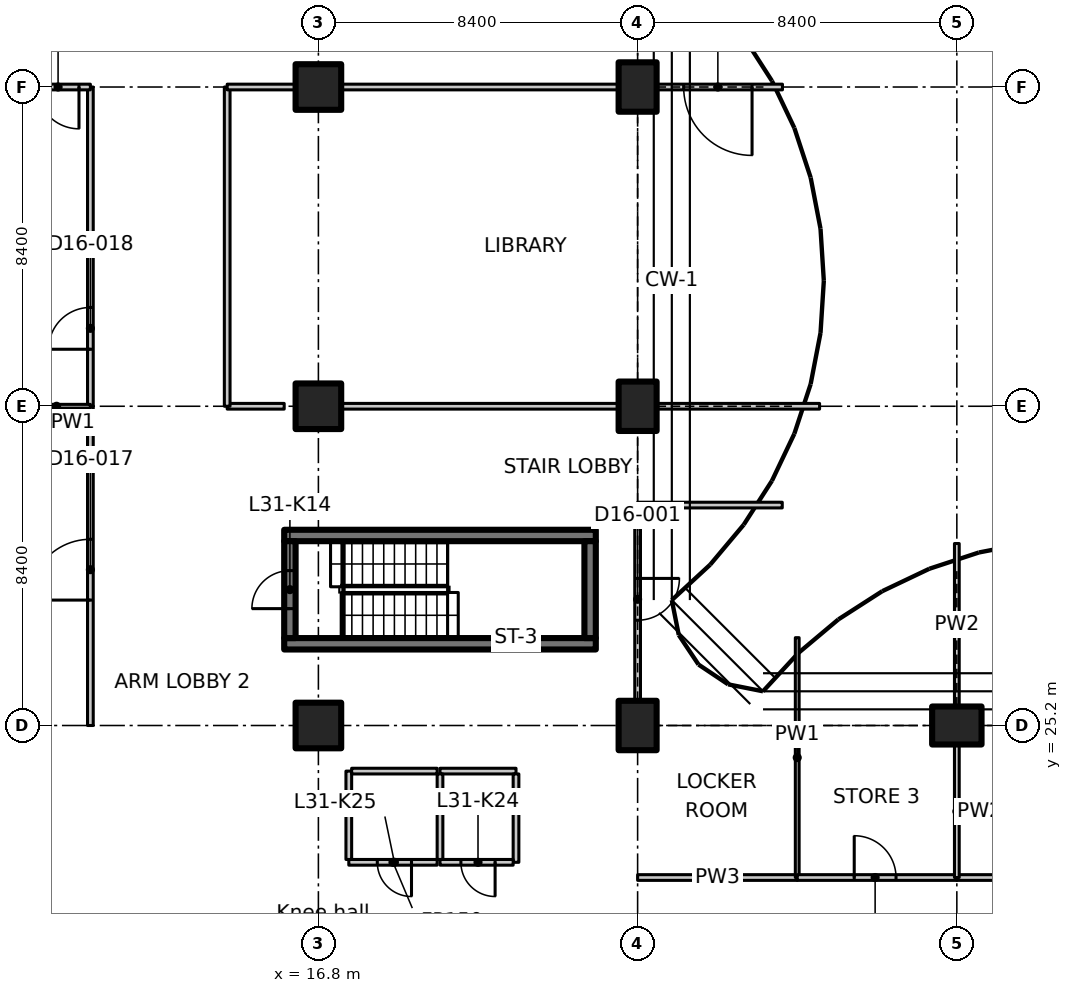
"""IFC4 building model, lengths in metres.
Left out: names, types, materials, properties, quantities, classifications, styles, units other than length and angle.
Written with IfcOpenShell. Run it as: python <this file> out.ifc"""

import sys

from ifc_helpers import new_model, si_unit, direction, frame, frame_2d, origin, origin_2d, place, context, subcontext, project, spatial, polyline, rectangle, outline, extrude, element, fill, save


model = new_model("IFC4")
c1 = context("Model", 3, precision=1e-05, world=origin(), true_north=direction((0.0, 1.0)))
c2 = subcontext(c1, "Body", "Model", "MODEL_VIEW")
j1 = project(units=[si_unit("LENGTHUNIT", "METRE"), si_unit("PLANEANGLEUNIT", "RADIAN")], contexts=[c1])
p1 = place(None, origin())
s1 = spatial("IfcSite", under=j1, at=p1, CompositionType="ELEMENT")
p2 = place(p1, origin())
s2 = spatial("IfcBuilding", under=s1, at=p2, CompositionType="ELEMENT")
p3 = place(p2, frame((0.0, 0.0, 127.7)))
s3 = spatial("IfcBuildingStorey", under=s2, at=p3, CompositionType="ELEMENT", Elevation=127.7)
for number, where, z_axis, x_axis in (
    (1, (16.8, 25.2, 0.0), (0.0, 0.0, 1.0), (1.0, 0.0, 0.0)),
    (2, (16.8, 33.6, 0.0), (0.0, 0.0, 1.0), (1.0, 0.0, 0.0)),
    (3, (16.8, 42.0, 0.0), (0.0, 0.0, 1.0), (1.0, 0.0, 0.0)),
):
    element("IfcColumn", number, at=place(p3, frame(where, z_axis=z_axis, x_axis=x_axis)), inside=s3, PredefinedType="COLUMN", context=c2, shape_type="SweptSolid", body=[
        extrude(rectangle(XDim=1.2, YDim=1.2, at=origin_2d()), origin(), (0.0, 0.0, 1.0), 3.35),
    ])
for number, where, z_axis, x_axis in (
    (4, (25.2, 25.2, 0.0), (0.0, 0.0, 1.0), (1.0, 0.0, 0.0)),
    (5, (25.2, 33.6, 0.0), (0.0, 0.0, 1.0), (1.0, 0.0, 0.0)),
    (6, (25.2, 42.0, 0.0), (0.0, 0.0, 1.0), (1.0, 0.0, 0.0)),
    (7, (33.6, 25.2, 0.0), (0.0, 0.0, 1.0), (0.0, 1.0, 0.0)),
):
    element("IfcColumn", number, at=place(p3, frame(where, z_axis=z_axis, x_axis=x_axis)), inside=s3, PredefinedType="COLUMN", context=c2, shape_type="SweptSolid", body=[
        extrude(rectangle(XDim=1.0, YDim=1.3, at=origin_2d()), origin(), (0.0, 0.0, 1.0), 3.35),
    ])
for number, where, z_axis, x_axis in (
    (8, (15.9, 27.35, 0.0), (0.0, 0.0, 1.0), (1.0, 0.0, 0.0)),
    (9, (15.9, 30.2, 0.0), (0.0, 0.0, 1.0), (1.0, 0.0, 0.0)),
):
    element("IfcWall", number, at=place(p3, frame(where, z_axis=z_axis, x_axis=x_axis)), inside=s3, PredefinedType="SHEAR", context=c2, shape_type="SweptSolid", body=[
        extrude(rectangle(XDim=8.2, YDim=0.3, at=frame_2d((4.1, 0.0))), origin(), (0.0, 0.0, 1.0), 3.35),
    ])
p4 = place(p3, frame((16.05, 27.5, 0.0), z_axis=(0.0, 0.0, 1.0), x_axis=(0.0, 1.0, 0.0)))
e10 = element("IfcWall", 10, at=p4, inside=s3, PredefinedType="SHEAR", context=c2, shape_type="SweptSolid", body=[
    extrude(rectangle(XDim=2.55, YDim=0.3, at=frame_2d((1.275, 0.0))), origin(), (0.0, 0.0, 1.0), 3.35),
])
p5 = place(p4, frame((0.775, 0.0, 0.0)))
e11 = element("IfcOpeningElement", 11, at=p5, cuts=e10, PredefinedType="OPENING", context=c2, shape_type="SweptSolid", body=[
    extrude(rectangle(XDim=1.0, YDim=2.1, at=frame_2d((0.5, 1.05))), frame((0.0, 0.16, 0.0), z_axis=(0.0, -1.0, 0.0), x_axis=(1.0, 0.0, 0.0)), (0.0, 0.0, 1.0), 0.32),
])
p6 = place(p3, frame((23.95, 27.5, 0.0), z_axis=(0.0, 0.0, 1.0), x_axis=(0.0, 1.0, 0.0)))
e12 = element("IfcWall", 12, at=p6, inside=s3, PredefinedType="SHEAR", context=c2, shape_type="SweptSolid", body=[
    extrude(rectangle(XDim=2.55, YDim=0.3, at=frame_2d((1.275, 0.0))), origin(), (0.0, 0.0, 1.0), 3.35),
])
p7 = place(p3, frame((20.0, 24.0, 0.0), z_axis=(0.0, 0.0, 1.0), x_axis=(1.0, 0.0, 0.0)))
e13 = element("IfcWall", 13, at=p7, inside=s3, PredefinedType="PARTITIONING", context=c2, shape_type="SweptSolid", body=[
    extrude(rectangle(XDim=2.0, YDim=0.15, at=frame_2d((1.0, 0.0))), origin(), (0.0, 0.0, 1.0), 3.35),
])
p8 = place(p3, frame((22.0, 23.925, 0.0), z_axis=(0.0, 0.0, 1.0), x_axis=(0.0, -1.0, 0.0)))
e14 = element("IfcWall", 14, at=p8, inside=s3, PredefinedType="PARTITIONING", context=c2, shape_type="SweptSolid", body=[
    extrude(rectangle(XDim=2.325, YDim=0.15, at=frame_2d((1.163, 0.0))), origin(), (0.0, 0.0, 1.0), 3.35),
])
p9 = place(p3, frame((21.925, 21.6, 0.0), z_axis=(0.0, 0.0, 1.0), x_axis=(-1.0, 0.0, 0.0)))
e15 = element("IfcWall", 15, at=p9, inside=s3, PredefinedType="PARTITIONING", context=c2, shape_type="SweptSolid", body=[
    extrude(rectangle(XDim=1.925, YDim=0.15, at=frame_2d((0.962, 0.0))), origin(), (0.0, 0.0, 1.0), 3.35),
])
p10 = place(p9, frame((0.475, 0.0, 0.0)))
e16 = element("IfcOpeningElement", 16, at=p10, cuts=e15, PredefinedType="OPENING", context=c2, shape_type="SweptSolid", body=[
    extrude(rectangle(XDim=0.9, YDim=2.1, at=frame_2d((0.45, 1.05))), frame((0.0, 0.085, 0.0), z_axis=(0.0, -1.0, 0.0), x_axis=(1.0, 0.0, 0.0)), (0.0, 0.0, 1.0), 0.17),
])
p11 = place(p3, frame((20.0, 21.675, 0.0), z_axis=(0.0, 0.0, 1.0), x_axis=(0.0, 1.0, 0.0)))
e17 = element("IfcWall", 17, at=p11, inside=s3, PredefinedType="PARTITIONING", context=c2, shape_type="SweptSolid", body=[
    extrude(rectangle(XDim=2.25, YDim=0.15, at=frame_2d((1.125, 0.0))), origin(), (0.0, 0.0, 1.0), 3.35),
])
p12 = place(p3, frame((19.925, 21.6, 0.0), z_axis=(0.0, 0.0, 1.0), x_axis=(-1.0, 0.0, 0.0)))
e18 = element("IfcWall", 18, at=p12, inside=s3, PredefinedType="PARTITIONING", context=c2, shape_type="SweptSolid", body=[
    extrude(rectangle(XDim=2.325, YDim=0.15, at=frame_2d((1.163, 0.0))), origin(), (0.0, 0.0, 1.0), 3.35),
])
p13 = place(p12, frame((0.675, 0.0, 0.0)))
e19 = element("IfcOpeningElement", 19, at=p13, cuts=e18, PredefinedType="OPENING", context=c2, shape_type="SweptSolid", body=[
    extrude(rectangle(XDim=0.9, YDim=2.1, at=frame_2d((0.45, 1.05))), frame((0.0, 0.085, 0.0), z_axis=(0.0, -1.0, 0.0), x_axis=(1.0, 0.0, 0.0)), (0.0, 0.0, 1.0), 0.17),
])
p14 = place(p3, frame((17.6, 21.675, 0.0), z_axis=(0.0, 0.0, 1.0), x_axis=(0.0, 1.0, 0.0)))
e20 = element("IfcWall", 20, at=p14, inside=s3, PredefinedType="PARTITIONING", context=c2, shape_type="SweptSolid", body=[
    extrude(rectangle(XDim=2.325, YDim=0.15, at=frame_2d((1.163, 0.0))), origin(), (0.0, 0.0, 1.0), 3.35),
])
p15 = place(p3, frame((17.675, 24.0, 0.0), z_axis=(0.0, 0.0, 1.0), x_axis=(1.0, 0.0, 0.0)))
e21 = element("IfcWall", 21, at=p15, inside=s3, PredefinedType="PARTITIONING", context=c2, shape_type="SweptSolid", body=[
    extrude(rectangle(XDim=2.25, YDim=0.15, at=frame_2d((1.125, 0.0))), origin(), (0.0, 0.0, 1.0), 3.35),
])
p16 = place(p3, frame((25.2, 21.2, 0.0), z_axis=(0.0, 0.0, 1.0), x_axis=(1.0, 0.0, 0.0)))
e22 = element("IfcWall", 22, at=p16, inside=s3, PredefinedType="PARTITIONING", context=c2, shape_type="SweptSolid", body=[
    extrude(rectangle(XDim=4.2, YDim=0.15, at=frame_2d((2.1, 0.0))), origin(), (0.0, 0.0, 1.0), 3.33),
])
p17 = place(p3, frame((29.4, 27.511, 0.0), z_axis=(0.0, 0.0, 1.0), x_axis=(0.0, -1.0, 0.0)))
e23 = element("IfcWall", 23, at=p17, inside=s3, PredefinedType="PARTITIONING", context=c2, shape_type="SweptSolid", body=[
    extrude(outline(polyline([(0.0, 0.0), (6.311, 0.0), (6.311, 3.33), (2.761, 3.33), (2.759, 2.98), (1.863, 2.98), (1.861, 3.33), (0.236, 3.33), (0.0, 3.33), (0.0, 0.0)])), frame((0.0, 0.05, 0.0), z_axis=(0.0, -1.0, 0.0), x_axis=(1.0, 0.0, 0.0)), (0.0, 0.0, 1.0), 0.1),
])
p18 = place(p3, frame((25.2, 31.0, 0.0), z_axis=(0.0, 0.0, 1.0), x_axis=(0.0, -1.0, 0.0)))
e24 = element("IfcWall", 24, at=p18, inside=s3, PredefinedType="PARTITIONING", context=c2, shape_type="SweptSolid", body=[
    extrude(outline(polyline([(0.0, 0.0), (5.13, 0.0), (5.13, 2.98), (0.0, 2.98), (0.0, 0.0)])), frame((0.0, 0.075, 0.0), z_axis=(0.0, -1.0, 0.0), x_axis=(1.0, 0.0, 0.0)), (0.0, 0.0, 1.0), 0.15),
])
p19 = place(p18, frame((1.93, 0.0, 0.0)))
e25 = element("IfcOpeningElement", 25, at=p19, cuts=e24, PredefinedType="OPENING", context=c2, shape_type="SweptSolid", body=[
    extrude(rectangle(XDim=1.1, YDim=2.1, at=frame_2d((0.55, 1.05))), frame((0.0, 0.085, 0.0), z_axis=(0.0, -1.0, 0.0), x_axis=(1.0, 0.0, 0.0)), (0.0, 0.0, 1.0), 0.17),
])
p20 = place(p3, frame((25.2, 31.0, 0.0), z_axis=(0.0, 0.0, 1.0), x_axis=(1.0, 0.0, 0.0)))
e26 = element("IfcWall", 26, at=p20, inside=s3, PredefinedType="PARTITIONING", context=c2, shape_type="SweptSolid", body=[
    extrude(rectangle(XDim=3.806, YDim=0.15, at=frame_2d((1.903, 0.0))), origin(), (0.0, 0.0, 1.0), 2.98),
])
p21 = place(p3, frame((29.4, 21.2, 0.0), z_axis=(0.0, 0.0, 1.0), x_axis=(1.0, 0.0, 0.0)))
e27 = element("IfcWall", 27, at=p21, inside=s3, PredefinedType="PARTITIONING", context=c2, shape_type="SweptSolid", body=[
    extrude(rectangle(XDim=4.2, YDim=0.15, at=frame_2d((2.1, 0.0))), origin(), (0.0, 0.0, 1.0), 3.33),
])
p22 = place(p21, frame((1.5, 0.0, 0.0)))
e28 = element("IfcOpeningElement", 28, at=p22, cuts=e27, PredefinedType="OPENING", context=c2, shape_type="SweptSolid", body=[
    extrude(rectangle(XDim=1.1, YDim=2.1, at=frame_2d((0.55, 1.05))), frame((0.0, 0.085, 0.0), z_axis=(0.0, -1.0, 0.0), x_axis=(1.0, 0.0, 0.0)), (0.0, 0.0, 1.0), 0.17),
])
p23 = place(p3, frame((33.6, 21.2, 0.0), z_axis=(0.0, 0.0, 1.0), x_axis=(1.0, 0.0, 0.0)))
e29 = element("IfcWall", 29, at=p23, inside=s3, PredefinedType="PARTITIONING", context=c2, shape_type="SweptSolid", body=[
    extrude(rectangle(XDim=12.6, YDim=0.15, at=frame_2d((6.3, 0.0))), origin(), (0.0, 0.0, 1.0), 3.33),
])
p24 = place(p23, frame((5.4, 0.0, 0.0)))
e30 = element("IfcOpeningElement", 30, at=p24, cuts=e29, PredefinedType="OPENING", context=c2, shape_type="SweptSolid", body=[
    extrude(rectangle(XDim=1.6, YDim=2.1, at=frame_2d((0.8, 1.05))), frame((0.0, 0.085, 0.0), z_axis=(0.0, -1.0, 0.0), x_axis=(1.0, 0.0, 0.0)), (0.0, 0.0, 1.0), 0.17),
])
p25 = place(p3, frame((33.6, 29.988, 0.0), z_axis=(0.0, 0.0, 1.0), x_axis=(0.0, -1.0, 0.0)))
e31 = element("IfcWall", 31, at=p25, inside=s3, PredefinedType="PARTITIONING", context=c2, shape_type="SweptSolid", body=[
    extrude(rectangle(XDim=4.268, YDim=0.125, at=frame_2d((2.134, 0.0))), origin(), (0.0, 0.0, 1.0), 2.98),
])
p26 = place(p3, frame((33.6, 24.68, 0.0), z_axis=(0.0, 0.0, 1.0), x_axis=(0.0, -1.0, 0.0)))
e32 = element("IfcWall", 32, at=p26, inside=s3, PredefinedType="PARTITIONING", context=c2, shape_type="SweptSolid", body=[
    extrude(rectangle(XDim=3.48, YDim=0.125, at=frame_2d((1.74, 0.0))), origin(), (0.0, 0.0, 1.0), 3.33),
])
p27 = place(p3, frame((10.8, 25.2, 0.0), z_axis=(0.0, 0.0, 1.0), x_axis=(0.0, 1.0, 0.0)))
e33 = element("IfcWall", 33, at=p27, inside=s3, PredefinedType="PARTITIONING", context=c2, shape_type="SweptSolid", body=[
    extrude(rectangle(XDim=8.4, YDim=0.15, at=frame_2d((4.2, 0.0))), origin(), (0.0, 0.0, 1.0), 3.33),
])
p28 = place(p27, frame((3.3, 0.0, 0.0)))
e34 = element("IfcOpeningElement", 34, at=p28, cuts=e33, PredefinedType="OPENING", context=c2, shape_type="SweptSolid", body=[
    extrude(rectangle(XDim=1.6, YDim=2.1, at=frame_2d((0.8, 1.05))), frame((0.0, 0.085, 0.0), z_axis=(0.0, -1.0, 0.0), x_axis=(1.0, 0.0, 0.0)), (0.0, 0.0, 1.0), 0.17),
])
p29 = place(p3, frame((14.4, 33.6, 0.0), z_axis=(0.0, 0.0, 1.0), x_axis=(1.0, 0.0, 0.0)))
e35 = element("IfcWall", 35, at=p29, inside=s3, PredefinedType="PARTITIONING", context=c2, shape_type="SweptSolid", body=[
    extrude(rectangle(XDim=1.5, YDim=0.15, at=frame_2d((0.75, 0.0))), origin(), (0.0, 0.0, 1.0), 3.33),
])
p30 = place(p3, frame((17.42, 33.6, 0.0), z_axis=(0.0, 0.0, 1.0), x_axis=(1.0, 0.0, 0.0)))
e36 = element("IfcWall", 36, at=p30, inside=s3, PredefinedType="PARTITIONING", context=c2, shape_type="SweptSolid", body=[
    extrude(rectangle(XDim=7.26, YDim=0.15, at=frame_2d((3.63, 0.0))), origin(), (0.0, 0.0, 1.0), 3.33),
])
p31 = place(p3, frame((25.72, 33.6, 0.0), z_axis=(0.0, 0.0, 1.0), x_axis=(1.0, 0.0, 0.0)))
e37 = element("IfcWall", 37, at=p31, inside=s3, PredefinedType="PARTITIONING", context=c2, shape_type="SweptSolid", body=[
    extrude(rectangle(XDim=4.268, YDim=0.15, at=frame_2d((2.134, 0.0))), origin(), (0.0, 0.0, 1.0), 2.98),
])
p32 = place(p3, frame((10.8, 33.6, 0.0), z_axis=(0.0, 0.0, 1.0), x_axis=(0.0, 1.0, 0.0)))
e38 = element("IfcWall", 38, at=p32, inside=s3, PredefinedType="PARTITIONING", context=c2, shape_type="SweptSolid", body=[
    extrude(rectangle(XDim=4.2, YDim=0.15, at=frame_2d((2.1, 0.0))), origin(), (0.0, 0.0, 1.0), 3.33),
])
p33 = place(p32, frame((1.5, 0.0, 0.0)))
e39 = element("IfcOpeningElement", 39, at=p33, cuts=e38, PredefinedType="OPENING", context=c2, shape_type="SweptSolid", body=[
    extrude(rectangle(XDim=1.1, YDim=2.1, at=frame_2d((0.55, 1.05))), frame((0.0, 0.085, 0.0), z_axis=(0.0, -1.0, 0.0), x_axis=(1.0, 0.0, 0.0)), (0.0, 0.0, 1.0), 0.17),
])
p34 = place(p3, frame((10.8, 37.8, 0.0), z_axis=(0.0, 0.0, 1.0), x_axis=(0.0, 1.0, 0.0)))
e40 = element("IfcWall", 40, at=p34, inside=s3, PredefinedType="PARTITIONING", context=c2, shape_type="SweptSolid", body=[
    extrude(rectangle(XDim=4.2, YDim=0.15, at=frame_2d((2.1, 0.0))), origin(), (0.0, 0.0, 1.0), 3.33),
])
p35 = place(p3, frame((14.4, 42.0, 0.0), z_axis=(0.0, 0.0, 1.0), x_axis=(0.0, -1.0, 0.0)))
e41 = element("IfcWall", 41, at=p35, inside=s3, PredefinedType="PARTITIONING", context=c2, shape_type="SweptSolid", body=[
    extrude(rectangle(XDim=8.4, YDim=0.15, at=frame_2d((4.2, 0.0))), origin(), (0.0, 0.0, 1.0), 3.33),
])
p36 = place(p3, frame((10.8, 42.0, 0.0), z_axis=(0.0, 0.0, 1.0), x_axis=(-1.0, 0.0, 0.0)))
e42 = element("IfcWall", 42, at=p36, inside=s3, PredefinedType="PARTITIONING", context=c2, shape_type="SweptSolid", body=[
    extrude(rectangle(XDim=1.78, YDim=0.15, at=frame_2d((0.89, 0.0))), origin(), (0.0, 0.0, 1.0), 3.33),
])
p37 = place(p36, frame((0.3, 0.0, 0.0)))
e43 = element("IfcOpeningElement", 43, at=p37, cuts=e42, PredefinedType="OPENING", context=c2, shape_type="SweptSolid", body=[
    extrude(rectangle(XDim=1.1, YDim=2.1, at=frame_2d((0.55, 1.05))), frame((0.0, 0.085, 0.0), z_axis=(0.0, -1.0, 0.0), x_axis=(1.0, 0.0, 0.0)), (0.0, 0.0, 1.0), 0.17),
])
p38 = place(p3, frame((9.02, 33.6, 0.0), z_axis=(0.0, 0.0, 1.0), x_axis=(1.0, 0.0, 0.0)))
e44 = element("IfcWall", 44, at=p38, inside=s3, PredefinedType="PARTITIONING", context=c2, shape_type="SweptSolid", body=[
    extrude(rectangle(XDim=1.78, YDim=0.1, at=frame_2d((0.89, 0.0))), origin(), (0.0, 0.0, 1.0), 3.33),
])
p39 = place(p3, frame((-1.365, 37.8, 0.0), z_axis=(0.0, 0.0, 1.0), x_axis=(1.0, 0.0, 0.0)))
e45 = element("IfcWall", 45, at=p39, inside=s3, PredefinedType="PARTITIONING", context=c2, shape_type="SweptSolid", body=[
    extrude(outline(polyline([(0.0, 0.0), (12.165, 0.0), (12.165, 3.33), (1.815, 3.33), (1.813, 2.98), (0.917, 2.98), (0.915, 3.33), (0.265, 3.33), (0.0, 3.33), (0.0, 0.0)])), frame((0.0, 0.05, 0.0), z_axis=(0.0, -1.0, 0.0), x_axis=(1.0, 0.0, 0.0)), (0.0, 0.0, 1.0), 0.1),
])
p40 = place(p3, frame((29.011, 42.0, 0.0), z_axis=(0.0, 0.0, 1.0), x_axis=(-1.0, 0.0, 0.0)))
e46 = element("IfcWall", 46, at=p40, inside=s3, PredefinedType="PARTITIONING", context=c2, shape_type="SweptSolid", body=[
    extrude(rectangle(XDim=3.292, YDim=0.15, at=frame_2d((1.646, 0.0))), origin(), (0.0, 0.0, 1.0), 2.98),
])
p41 = place(p40, frame((0.8, 0.0, 0.0)))
e47 = element("IfcOpeningElement", 47, at=p41, cuts=e46, PredefinedType="OPENING", context=c2, shape_type="SweptSolid", body=[
    extrude(rectangle(XDim=1.8, YDim=2.1, at=frame_2d((0.9, 1.05))), frame((0.0, 0.085, 0.0), z_axis=(0.0, -1.0, 0.0), x_axis=(1.0, 0.0, 0.0)), (0.0, 0.0, 1.0), 0.17),
])
p42 = place(p3, frame((24.68, 42.0, 0.0), z_axis=(0.0, 0.0, 1.0), x_axis=(-1.0, 0.0, 0.0)))
e48 = element("IfcWall", 48, at=p42, inside=s3, PredefinedType="PARTITIONING", context=c2, shape_type="SweptSolid", body=[
    extrude(rectangle(XDim=7.26, YDim=0.15, at=frame_2d((3.63, 0.0))), origin(), (0.0, 0.0, 1.0), 3.33),
])
p43 = place(p3, frame((16.18, 42.0, 0.0), z_axis=(0.0, 0.0, 1.0), x_axis=(-1.0, 0.0, 0.0)))
e49 = element("IfcWall", 49, at=p43, inside=s3, PredefinedType="PARTITIONING", context=c2, shape_type="SweptSolid", body=[
    extrude(rectangle(XDim=1.78, YDim=0.15, at=frame_2d((0.89, 0.0))), origin(), (0.0, 0.0, 1.0), 3.33),
])
p44 = place(p5, origin())
e50 = element("IfcDoor", 50, at=p44, inside=s3, OperationType="SINGLE_SWING_LEFT", PredefinedType="DOOR", context=c2, shape_type="SweptSolid", body=[
    extrude(rectangle(XDim=1.0, YDim=2.1, at=frame_2d((0.5, 1.05))), frame((0.0, 0.025, 0.0), z_axis=(0.0, -1.0, 0.0), x_axis=(1.0, 0.0, 0.0)), (0.0, 0.0, 1.0), 0.05),
])
fill(e11, e50)
p45 = place(p10, origin())
e51 = element("IfcDoor", 51, at=p45, inside=s3, OperationType="SINGLE_SWING_LEFT", PredefinedType="DOOR", context=c2, shape_type="SweptSolid", body=[
    extrude(rectangle(XDim=0.9, YDim=2.1, at=frame_2d((0.45, 1.05))), frame((0.0, 0.025, 0.0), z_axis=(0.0, -1.0, 0.0), x_axis=(1.0, 0.0, 0.0)), (0.0, 0.0, 1.0), 0.05),
])
fill(e16, e51)
p46 = place(p13, origin())
e52 = element("IfcDoor", 52, at=p46, inside=s3, OperationType="SINGLE_SWING_RIGHT", PredefinedType="DOOR", context=c2, shape_type="SweptSolid", body=[
    extrude(rectangle(XDim=0.9, YDim=2.1, at=frame_2d((0.45, 1.05))), frame((0.0, 0.025, 0.0), z_axis=(0.0, -1.0, 0.0), x_axis=(1.0, 0.0, 0.0)), (0.0, 0.0, 1.0), 0.05),
])
fill(e19, e52)
p47 = place(p19, origin())
e53 = element("IfcDoor", 53, at=p47, inside=s3, OperationType="SINGLE_SWING_RIGHT", PredefinedType="DOOR", context=c2, shape_type="SweptSolid", body=[
    extrude(rectangle(XDim=1.1, YDim=2.1, at=frame_2d((0.55, 1.05))), frame((0.0, 0.025, 0.0), z_axis=(0.0, -1.0, 0.0), x_axis=(1.0, 0.0, 0.0)), (0.0, 0.0, 1.0), 0.05),
])
fill(e25, e53)
p48 = place(p22, origin())
e54 = element("IfcDoor", 54, at=p48, inside=s3, OperationType="SINGLE_SWING_LEFT", PredefinedType="DOOR", context=c2, shape_type="SweptSolid", body=[
    extrude(rectangle(XDim=1.1, YDim=2.1, at=frame_2d((0.55, 1.05))), frame((0.0, 0.025, 0.0), z_axis=(0.0, -1.0, 0.0), x_axis=(1.0, 0.0, 0.0)), (0.0, 0.0, 1.0), 0.05),
])
fill(e28, e54)
p49 = place(p28, origin())
e55 = element("IfcDoor", 55, at=p49, inside=s3, OperationType="DOUBLE_DOOR_SINGLE_SWING", PredefinedType="DOOR", context=c2, shape_type="SweptSolid", body=[
    extrude(rectangle(XDim=1.6, YDim=2.1, at=frame_2d((0.8, 1.05))), frame((0.0, 0.025, 0.0), z_axis=(0.0, -1.0, 0.0), x_axis=(1.0, 0.0, 0.0)), (0.0, 0.0, 1.0), 0.05),
])
fill(e34, e55)
p50 = place(p33, origin())
e56 = element("IfcDoor", 56, at=p50, inside=s3, OperationType="SINGLE_SWING_LEFT", PredefinedType="DOOR", context=c2, shape_type="SweptSolid", body=[
    extrude(rectangle(XDim=1.1, YDim=2.1, at=frame_2d((0.55, 1.05))), frame((0.0, 0.025, 0.0), z_axis=(0.0, -1.0, 0.0), x_axis=(1.0, 0.0, 0.0)), (0.0, 0.0, 1.0), 0.05),
])
fill(e39, e56)
p51 = place(p37, origin())
e57 = element("IfcDoor", 57, at=p51, inside=s3, OperationType="SINGLE_SWING_LEFT", PredefinedType="DOOR", context=c2, shape_type="SweptSolid", body=[
    extrude(rectangle(XDim=1.1, YDim=2.1, at=frame_2d((0.55, 1.05))), frame((0.0, 0.025, 0.0), z_axis=(0.0, -1.0, 0.0), x_axis=(1.0, 0.0, 0.0)), (0.0, 0.0, 1.0), 0.05),
])
fill(e43, e57)
p52 = place(p41, origin())
e58 = element("IfcDoor", 58, at=p52, inside=s3, OperationType="DOUBLE_DOOR_SINGLE_SWING", PredefinedType="DOOR", context=c2, shape_type="SweptSolid", body=[
    extrude(rectangle(XDim=1.8, YDim=2.1, at=frame_2d((0.9, 1.05))), frame((0.0, 0.025, 0.0), z_axis=(0.0, -1.0, 0.0), x_axis=(1.0, 0.0, 0.0)), (0.0, 0.0, 1.0), 0.05),
])
fill(e47, e58)
save(model, sys.argv[1])
